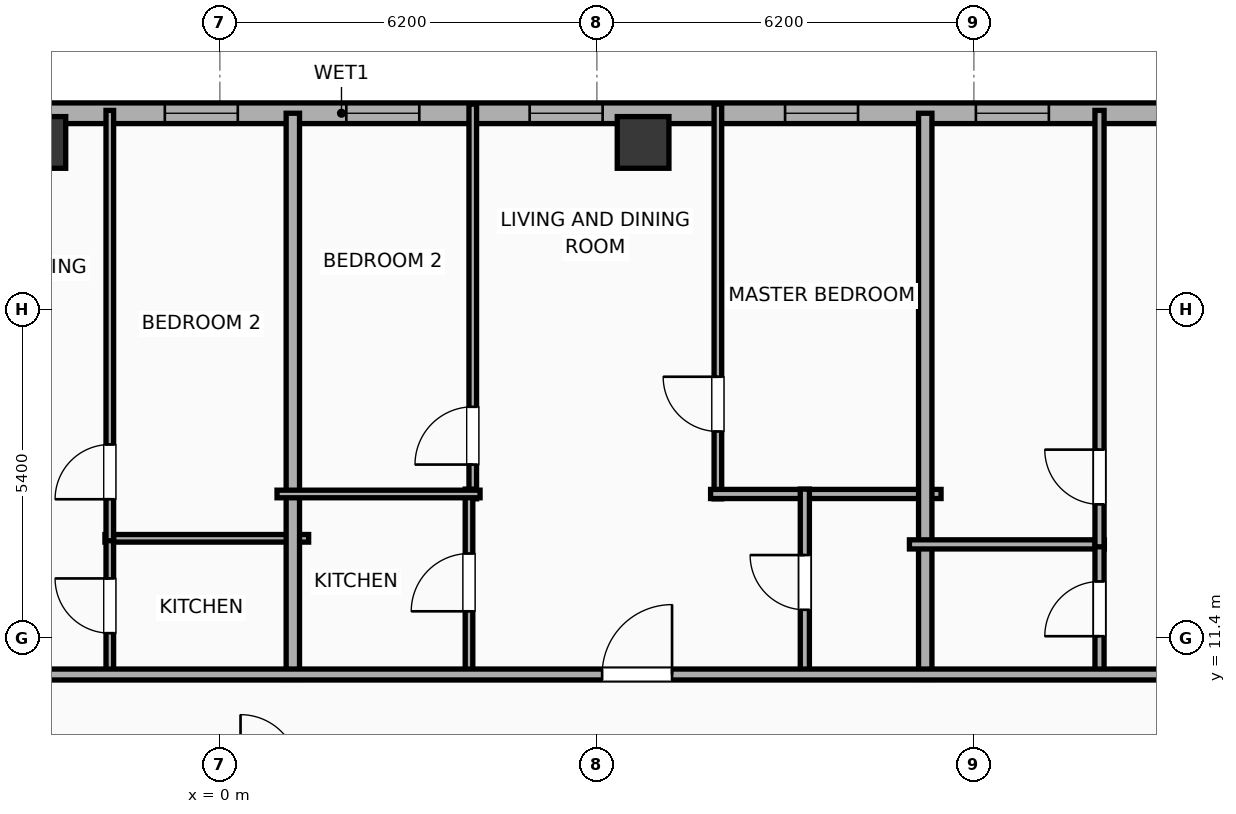
"""IFC4 building model, lengths in metres.
Left out: names, types, materials, properties, quantities, classifications, styles, units other than length and angle.
Written with IfcOpenShell. Run it as: python <this file> out.ifc"""

import sys

from ifc_helpers import new_model, si_unit, direction, frame, frame_2d, origin, origin_2d, place, context, subcontext, project, spatial, rectangle, hollow_rectangle, extrude, element, fill, save


model = new_model("IFC4")
c1 = context("Model", 3, precision=1e-05, world=origin(), true_north=direction((0.0, 1.0)))
c2 = subcontext(c1, "Body", "Model", "MODEL_VIEW")
j1 = project(units=[si_unit("LENGTHUNIT", "METRE"), si_unit("PLANEANGLEUNIT", "RADIAN")], contexts=[c1])
p1 = place(None, origin())
s1 = spatial("IfcSite", under=j1, at=p1, CompositionType="ELEMENT")
p2 = place(p1, origin())
s2 = spatial("IfcBuilding", under=s1, at=p2, CompositionType="ELEMENT")
p3 = place(p2, frame((0.0, 0.0, 219.7)))
s3 = spatial("IfcBuildingStorey", under=s2, at=p3, CompositionType="ELEMENT", Elevation=219.7)
for number, where, z_axis, x_axis in (
    (1, (6.96, 19.55, 0.0), (0.0, 0.0, 1.0), (1.0, 0.0, 0.0)),
    (2, (-2.96, 19.55, 0.0), (0.0, 0.0, 1.0), (1.0, 0.0, 0.0)),
):
    element("IfcColumn", number, at=place(p3, frame(where, z_axis=z_axis, x_axis=x_axis)), inside=s3, PredefinedType="COLUMN", context=c2, shape_type="SweptSolid", body=[
        extrude(hollow_rectangle(XDim=0.85, YDim=0.85, WallThickness=0.028, at=origin_2d()), origin(), (0.0, 0.0, 1.0), 3.9),
    ])
p4 = place(p3, frame((-22.783, 20.03, 0.0), z_axis=(0.0, 0.0, 1.0), x_axis=(1.0, 0.0, 0.0)))
e3 = element("IfcWall", 3, at=p4, inside=s3, PredefinedType="ELEMENTEDWALL", context=c2, shape_type="SweptSolid", body=[
    extrude(rectangle(XDim=49.566, YDim=0.34, at=frame_2d((24.783, 0.0))), origin(), (0.0, 0.0, 1.0), 3.65),
])
p5 = place(p4, frame((40.956, 0.0, 0.75)))
e4 = element("IfcOpeningElement", 4, at=p5, cuts=e3, PredefinedType="OPENING", context=c2, shape_type="SweptSolid", body=[
    extrude(rectangle(XDim=2.4, YDim=2.1, at=frame_2d((1.2, 1.05))), frame((0.0, 0.18, 0.0), z_axis=(0.0, -1.0, 0.0), x_axis=(1.0, 0.0, 0.0)), (0.0, 0.0, 1.0), 0.36),
])
p6 = place(p4, frame((1.437, 0.0, 0.75)))
e5 = element("IfcOpeningElement", 5, at=p6, cuts=e3, PredefinedType="OPENING", context=c2, shape_type="SweptSolid", body=[
    extrude(rectangle(XDim=1.2, YDim=2.05, at=frame_2d((0.6, 1.025))), frame((0.0, 0.18, 0.0), z_axis=(0.0, -1.0, 0.0), x_axis=(1.0, 0.0, 0.0)), (0.0, 0.0, 1.0), 0.36),
])
p7 = place(p4, frame((7.619, 0.0, 0.75)))
e6 = element("IfcOpeningElement", 6, at=p7, cuts=e3, PredefinedType="OPENING", context=c2, shape_type="SweptSolid", body=[
    extrude(rectangle(XDim=1.2, YDim=2.05, at=frame_2d((0.6, 1.025))), frame((0.0, 0.18, 0.0), z_axis=(0.0, -1.0, 0.0), x_axis=(1.0, 0.0, 0.0)), (0.0, 0.0, 1.0), 0.36),
])
p8 = place(p4, frame((4.124, 0.0, 0.75)))
e7 = element("IfcOpeningElement", 7, at=p8, cuts=e3, PredefinedType="OPENING", context=c2, shape_type="SweptSolid", body=[
    extrude(rectangle(XDim=1.2, YDim=2.05, at=frame_2d((0.6, 1.025))), frame((0.0, 0.18, 0.0), z_axis=(0.0, -1.0, 0.0), x_axis=(1.0, 0.0, 0.0)), (0.0, 0.0, 1.0), 0.36),
])
p9 = place(p4, frame((11.278, 0.0, 0.75)))
e8 = element("IfcOpeningElement", 8, at=p9, cuts=e3, PredefinedType="OPENING", context=c2, shape_type="SweptSolid", body=[
    extrude(rectangle(XDim=1.2, YDim=2.05, at=frame_2d((0.6, 1.025))), frame((0.0, 0.18, 0.0), z_axis=(0.0, -1.0, 0.0), x_axis=(1.0, 0.0, 0.0)), (0.0, 0.0, 1.0), 0.36),
])
p10 = place(p4, frame((17.953, 0.0, 0.75)))
e9 = element("IfcOpeningElement", 9, at=p10, cuts=e3, PredefinedType="OPENING", context=c2, shape_type="SweptSolid", body=[
    extrude(rectangle(XDim=1.2, YDim=2.05, at=frame_2d((0.6, 1.025))), frame((0.0, 0.18, 0.0), z_axis=(0.0, -1.0, 0.0), x_axis=(1.0, 0.0, 0.0)), (0.0, 0.0, 1.0), 0.36),
])
p11 = place(p4, frame((14.738, 0.0, 0.75)))
e10 = element("IfcOpeningElement", 10, at=p11, cuts=e3, PredefinedType="OPENING", context=c2, shape_type="SweptSolid", body=[
    extrude(rectangle(XDim=1.2, YDim=2.05, at=frame_2d((0.6, 1.025))), frame((0.0, 0.18, 0.0), z_axis=(0.0, -1.0, 0.0), x_axis=(1.0, 0.0, 0.0)), (0.0, 0.0, 1.0), 0.36),
])
p12 = place(p4, frame((21.878, 0.0, 0.75)))
e11 = element("IfcOpeningElement", 11, at=p12, cuts=e3, PredefinedType="OPENING", context=c2, shape_type="SweptSolid", body=[
    extrude(rectangle(XDim=1.2, YDim=2.05, at=frame_2d((0.6, 1.025))), frame((0.0, 0.18, 0.0), z_axis=(0.0, -1.0, 0.0), x_axis=(1.0, 0.0, 0.0)), (0.0, 0.0, 1.0), 0.36),
])
p13 = place(p4, frame((27.878, 0.0, 0.75)))
e12 = element("IfcOpeningElement", 12, at=p13, cuts=e3, PredefinedType="OPENING", context=c2, shape_type="SweptSolid", body=[
    extrude(rectangle(XDim=1.2, YDim=2.05, at=frame_2d((0.6, 1.025))), frame((0.0, 0.18, 0.0), z_axis=(0.0, -1.0, 0.0), x_axis=(1.0, 0.0, 0.0)), (0.0, 0.0, 1.0), 0.36),
])
p14 = place(p4, frame((24.863, 0.0, 0.75)))
e13 = element("IfcOpeningElement", 13, at=p14, cuts=e3, PredefinedType="OPENING", context=c2, shape_type="SweptSolid", body=[
    extrude(rectangle(XDim=1.2, YDim=2.05, at=frame_2d((0.6, 1.025))), frame((0.0, 0.18, 0.0), z_axis=(0.0, -1.0, 0.0), x_axis=(1.0, 0.0, 0.0)), (0.0, 0.0, 1.0), 0.36),
])
p15 = place(p4, frame((32.078, 0.0, 0.75)))
e14 = element("IfcOpeningElement", 14, at=p15, cuts=e3, PredefinedType="OPENING", context=c2, shape_type="SweptSolid", body=[
    extrude(rectangle(XDim=1.2, YDim=2.05, at=frame_2d((0.6, 1.025))), frame((0.0, 0.18, 0.0), z_axis=(0.0, -1.0, 0.0), x_axis=(1.0, 0.0, 0.0)), (0.0, 0.0, 1.0), 0.36),
])
p16 = place(p4, frame((35.216, 0.0, 0.75)))
e15 = element("IfcOpeningElement", 15, at=p16, cuts=e3, PredefinedType="OPENING", context=c2, shape_type="SweptSolid", body=[
    extrude(rectangle(XDim=1.2, YDim=2.05, at=frame_2d((0.6, 1.025))), frame((0.0, 0.18, 0.0), z_axis=(0.0, -1.0, 0.0), x_axis=(1.0, 0.0, 0.0)), (0.0, 0.0, 1.0), 0.36),
])
p17 = place(p4, frame((45.73, 0.0, 0.75)))
e16 = element("IfcOpeningElement", 16, at=p17, cuts=e3, PredefinedType="OPENING", context=c2, shape_type="SweptSolid", body=[
    extrude(rectangle(XDim=1.2, YDim=2.05, at=frame_2d((0.6, 1.025))), frame((0.0, 0.18, 0.0), z_axis=(0.0, -1.0, 0.0), x_axis=(1.0, 0.0, 0.0)), (0.0, 0.0, 1.0), 0.36),
])
p18 = place(p3, frame((-1.89, 13.04, 0.0), z_axis=(0.0, 0.0, 1.0), x_axis=(1.0, 0.0, 0.0)))
e17 = element("IfcWall", 17, at=p18, inside=s3, PredefinedType="PARTITIONING", context=c2, shape_type="SweptSolid", body=[
    extrude(rectangle(XDim=3.35, YDim=0.125, at=frame_2d((1.675, 0.0))), origin(), (0.0, 0.0, 1.0), 3.65),
])
p19 = place(p3, frame((-1.81, 10.78, 0.0), z_axis=(0.0, 0.0, 1.0), x_axis=(0.0, 1.0, 0.0)))
e18 = element("IfcWall", 18, at=p19, inside=s3, PredefinedType="PARTITIONING", context=c2, shape_type="SweptSolid", body=[
    extrude(rectangle(XDim=2.3, YDim=0.125, at=frame_2d((1.15, 0.0))), origin(), (0.0, 0.0, 1.0), 3.65),
])
p20 = place(p19, frame((0.7, 0.0, 0.0)))
e19 = element("IfcOpeningElement", 19, at=p20, cuts=e18, PredefinedType="OPENING", context=c2, shape_type="SweptSolid", body=[
    extrude(rectangle(XDim=0.9, YDim=2.05, at=frame_2d((0.45, 1.025))), frame((0.0, 0.073, 0.0), z_axis=(0.0, -1.0, 0.0), x_axis=(1.0, 0.0, 0.0)), (0.0, 0.0, 1.0), 0.145),
])
p21 = place(p3, frame((-1.81, 13.0, 0.0), z_axis=(0.0, 0.0, 1.0), x_axis=(0.0, 1.0, 0.0)))
e20 = element("IfcWall", 20, at=p21, inside=s3, PredefinedType="PARTITIONING", context=c2, shape_type="SweptSolid", body=[
    extrude(rectangle(XDim=7.077, YDim=0.125, at=frame_2d((3.539, 0.0))), origin(), (0.0, 0.0, 1.0), 3.65),
])
p22 = place(p21, frame((0.682, 0.0, 0.0)))
e21 = element("IfcOpeningElement", 21, at=p22, cuts=e20, PredefinedType="OPENING", context=c2, shape_type="SweptSolid", body=[
    extrude(rectangle(XDim=0.9, YDim=2.05, at=frame_2d((0.45, 1.025))), frame((0.0, 0.073, 0.0), z_axis=(0.0, -1.0, 0.0), x_axis=(1.0, 0.0, 0.0)), (0.0, 0.0, 1.0), 0.145),
])
p23 = place(p3, frame((1.2, 10.72, 0.0), z_axis=(0.0, 0.0, 1.0), x_axis=(0.0, 1.0, 0.0)))
e22 = element("IfcWall", 22, at=p23, inside=s3, PredefinedType="PARTITIONING", context=c2, shape_type="SweptSolid", body=[
    extrude(rectangle(XDim=9.31, YDim=0.22, at=frame_2d((4.655, 0.0))), origin(), (0.0, 0.0, 1.0), 3.65),
])
p24 = place(p3, frame((4.159, 13.689, 0.0), z_axis=(0.0, 0.0, 1.0), x_axis=(0.0, 1.0, 0.0)))
e23 = element("IfcWall", 23, at=p24, inside=s3, PredefinedType="PARTITIONING", context=c2, shape_type="SweptSolid", body=[
    extrude(rectangle(XDim=6.491, YDim=0.125, at=frame_2d((3.246, 0.0))), origin(), (0.0, 0.0, 1.0), 3.65),
])
p25 = place(p24, frame((0.564, 0.0, 0.0)))
e24 = element("IfcOpeningElement", 24, at=p25, cuts=e23, PredefinedType="OPENING", context=c2, shape_type="SweptSolid", body=[
    extrude(rectangle(XDim=0.95, YDim=2.05, at=frame_2d((0.475, 1.025))), frame((0.0, 0.073, 0.0), z_axis=(0.0, -1.0, 0.0), x_axis=(1.0, 0.0, 0.0)), (0.0, 0.0, 1.0), 0.145),
])
p26 = place(p3, frame((8.19, 13.689, 0.0), z_axis=(0.0, 0.0, 1.0), x_axis=(0.0, 1.0, 0.0)))
e25 = element("IfcWall", 25, at=p26, inside=s3, PredefinedType="PARTITIONING", context=c2, shape_type="SweptSolid", body=[
    extrude(rectangle(XDim=6.491, YDim=0.125, at=frame_2d((3.246, 0.0))), origin(), (0.0, 0.0, 1.0), 3.65),
])
p27 = place(p26, frame((1.108, 0.0, 0.0)))
e26 = element("IfcOpeningElement", 26, at=p27, cuts=e25, PredefinedType="OPENING", context=c2, shape_type="SweptSolid", body=[
    extrude(rectangle(XDim=0.9, YDim=2.05, at=frame_2d((0.45, 1.025))), frame((0.0, 0.073, 0.0), z_axis=(0.0, -1.0, 0.0), x_axis=(1.0, 0.0, 0.0)), (0.0, 0.0, 1.0), 0.145),
])
p28 = place(p3, frame((8.07, 13.769, 0.0), z_axis=(0.0, 0.0, 1.0), x_axis=(1.0, 0.0, 0.0)))
e27 = element("IfcWall", 27, at=p28, inside=s3, PredefinedType="PLUMBINGWALL", context=c2, shape_type="SweptSolid", body=[
    extrude(rectangle(XDim=3.79, YDim=0.15, at=frame_2d((1.895, 0.0))), origin(), (0.0, 0.0, 1.0), 3.65),
])
p29 = place(p3, frame((4.097, 10.78, 0.0), z_axis=(0.0, 0.0, 1.0), x_axis=(0.0, 1.0, 0.0)))
e28 = element("IfcWall", 28, at=p29, inside=s3, PredefinedType="PARTITIONING", context=c2, shape_type="SweptSolid", body=[
    extrude(rectangle(XDim=3.069, YDim=0.125, at=frame_2d((1.535, 0.0))), origin(), (0.0, 0.0, 1.0), 3.65),
])
p30 = place(p29, frame((1.06, 0.0, 0.0)))
e29 = element("IfcOpeningElement", 29, at=p30, cuts=e28, PredefinedType="OPENING", context=c2, shape_type="SweptSolid", body=[
    extrude(rectangle(XDim=0.95, YDim=2.05, at=frame_2d((0.475, 1.025))), frame((0.0, 0.073, 0.0), z_axis=(0.0, -1.0, 0.0), x_axis=(1.0, 0.0, 0.0)), (0.0, 0.0, 1.0), 0.145),
])
p31 = place(p3, frame((0.94, 13.769, 0.0), z_axis=(0.0, 0.0, 1.0), x_axis=(1.0, 0.0, 0.0)))
e30 = element("IfcWall", 30, at=p31, inside=s3, PredefinedType="PARTITIONING", context=c2, shape_type="SweptSolid", body=[
    extrude(rectangle(XDim=3.339, YDim=0.125, at=frame_2d((1.669, 0.0))), origin(), (0.0, 0.0, 1.0), 3.65),
])
p32 = place(p3, frame((9.62, 10.78, 0.0), z_axis=(0.0, 0.0, 1.0), x_axis=(0.0, 1.0, 0.0)))
e31 = element("IfcWall", 31, at=p32, inside=s3, PredefinedType="PLUMBINGWALL", context=c2, shape_type="SweptSolid", body=[
    extrude(rectangle(XDim=3.069, YDim=0.15, at=frame_2d((1.535, 0.0))), origin(), (0.0, 0.0, 1.0), 3.65),
])
p33 = place(p32, frame((1.084, 0.0, 0.0)))
e32 = element("IfcOpeningElement", 32, at=p33, cuts=e31, PredefinedType="OPENING", context=c2, shape_type="SweptSolid", body=[
    extrude(rectangle(XDim=0.9, YDim=2.05, at=frame_2d((0.45, 1.025))), frame((0.0, 0.085, 0.0), z_axis=(0.0, -1.0, 0.0), x_axis=(1.0, 0.0, 0.0)), (0.0, 0.0, 1.0), 0.17),
])
p34 = place(p3, frame((11.6, 10.72, 0.0), z_axis=(0.0, 0.0, 1.0), x_axis=(0.0, 1.0, 0.0)))
e33 = element("IfcWall", 33, at=p34, inside=s3, PredefinedType="PARTITIONING", context=c2, shape_type="SweptSolid", body=[
    extrude(rectangle(XDim=9.31, YDim=0.22, at=frame_2d((4.655, 0.0))), origin(), (0.0, 0.0, 1.0), 3.65),
])
p35 = place(p3, frame((11.34, 12.94, 0.0), z_axis=(0.0, 0.0, 1.0), x_axis=(1.0, 0.0, 0.0)))
e34 = element("IfcWall", 34, at=p35, inside=s3, PredefinedType="PLUMBINGWALL", context=c2, shape_type="SweptSolid", body=[
    extrude(rectangle(XDim=3.206, YDim=0.15, at=frame_2d((1.603, 0.0))), origin(), (0.0, 0.0, 1.0), 3.65),
])
p36 = place(p3, frame((14.466, 10.78, 0.0), z_axis=(0.0, 0.0, 1.0), x_axis=(0.0, 1.0, 0.0)))
e35 = element("IfcWall", 35, at=p36, inside=s3, PredefinedType="PLUMBINGWALL", context=c2, shape_type="SweptSolid", body=[
    extrude(rectangle(XDim=2.2, YDim=0.15, at=frame_2d((1.1, 0.0))), origin(), (0.0, 0.0, 1.0), 3.65),
])
p37 = place(p36, frame((0.65, 0.0, 0.0)))
e36 = element("IfcOpeningElement", 36, at=p37, cuts=e35, PredefinedType="OPENING", context=c2, shape_type="SweptSolid", body=[
    extrude(rectangle(XDim=0.9, YDim=2.05, at=frame_2d((0.45, 1.025))), frame((0.0, 0.085, 0.0), z_axis=(0.0, -1.0, 0.0), x_axis=(1.0, 0.0, 0.0)), (0.0, 0.0, 1.0), 0.17),
])
p38 = place(p3, frame((14.466, 12.9, 0.0), z_axis=(0.0, 0.0, 1.0), x_axis=(0.0, 1.0, 0.0)))
e37 = element("IfcWall", 37, at=p38, inside=s3, PredefinedType="PLUMBINGWALL", context=c2, shape_type="SweptSolid", body=[
    extrude(rectangle(XDim=7.177, YDim=0.15, at=frame_2d((3.588, 0.0))), origin(), (0.0, 0.0, 1.0), 3.65),
])
p39 = place(p38, frame((0.698, 0.0, 0.0)))
e38 = element("IfcOpeningElement", 38, at=p39, cuts=e37, PredefinedType="OPENING", context=c2, shape_type="SweptSolid", body=[
    extrude(rectangle(XDim=0.9, YDim=2.05, at=frame_2d((0.45, 1.025))), frame((0.0, 0.085, 0.0), z_axis=(0.0, -1.0, 0.0), x_axis=(1.0, 0.0, 0.0)), (0.0, 0.0, 1.0), 0.17),
])
p40 = place(p3, frame((-26.23, 10.8, 0.0), z_axis=(0.0, 0.0, 1.0), x_axis=(1.0, 0.0, 0.0)))
e39 = element("IfcWall", 39, at=p40, inside=s3, PredefinedType="PARTITIONING", context=c2, shape_type="SweptSolid", body=[
    extrude(rectangle(XDim=56.46, YDim=0.18, at=frame_2d((28.23, 0.0))), origin(), (0.0, 0.0, 1.0), 3.65),
])
p41 = place(p40, frame((2.994, 0.0, 0.0)))
e40 = element("IfcOpeningElement", 40, at=p41, cuts=e39, PredefinedType="OPENING", context=c2, shape_type="SweptSolid", body=[
    extrude(rectangle(XDim=0.9, YDim=2.05, at=frame_2d((0.45, 1.025))), frame((0.0, 0.1, 0.0), z_axis=(0.0, -1.0, 0.0), x_axis=(1.0, 0.0, 0.0)), (0.0, 0.0, 1.0), 0.2),
])
p42 = place(p40, frame((11.745, 0.0, 0.0)))
e41 = element("IfcOpeningElement", 41, at=p42, cuts=e39, PredefinedType="OPENING", context=c2, shape_type="SweptSolid", body=[
    extrude(rectangle(XDim=1.15, YDim=2.05, at=frame_2d((0.575, 1.025))), frame((0.0, 0.1, 0.0), z_axis=(0.0, -1.0, 0.0), x_axis=(1.0, 0.0, 0.0)), (0.0, 0.0, 1.0), 0.2),
])
p43 = place(p40, frame((21.907, 0.0, 0.0)))
e42 = element("IfcOpeningElement", 42, at=p43, cuts=e39, PredefinedType="OPENING", context=c2, shape_type="SweptSolid", body=[
    extrude(rectangle(XDim=1.15, YDim=2.05, at=frame_2d((0.575, 1.025))), frame((0.0, 0.1, 0.0), z_axis=(0.0, -1.0, 0.0), x_axis=(1.0, 0.0, 0.0)), (0.0, 0.0, 1.0), 0.2),
])
p44 = place(p40, frame((32.516, 0.0, 0.0)))
e43 = element("IfcOpeningElement", 43, at=p44, cuts=e39, PredefinedType="OPENING", context=c2, shape_type="SweptSolid", body=[
    extrude(rectangle(XDim=1.15, YDim=2.05, at=frame_2d((0.575, 1.025))), frame((0.0, 0.1, 0.0), z_axis=(0.0, -1.0, 0.0), x_axis=(1.0, 0.0, 0.0)), (0.0, 0.0, 1.0), 0.2),
])
p45 = place(p40, frame((41.956, 0.0, 0.0)))
e44 = element("IfcOpeningElement", 44, at=p45, cuts=e39, PredefinedType="OPENING", context=c2, shape_type="SweptSolid", body=[
    extrude(rectangle(XDim=1.15, YDim=2.05, at=frame_2d((0.575, 1.025))), frame((0.0, 0.1, 0.0), z_axis=(0.0, -1.0, 0.0), x_axis=(1.0, 0.0, 0.0)), (0.0, 0.0, 1.0), 0.2),
])
p46 = place(p40, frame((51.656, 0.0, 0.0)))
e45 = element("IfcOpeningElement", 45, at=p46, cuts=e39, PredefinedType="OPENING", context=c2, shape_type="SweptSolid", body=[
    extrude(rectangle(XDim=1.15, YDim=2.05, at=frame_2d((0.575, 1.025))), frame((0.0, 0.1, 0.0), z_axis=(0.0, -1.0, 0.0), x_axis=(1.0, 0.0, 0.0)), (0.0, 0.0, 1.0), 0.2),
])
p47 = place(p12, origin())
e46 = element("IfcWindow", 46, at=p47, inside=s3, PartitioningType="SINGLE_PANEL", PredefinedType="WINDOW", context=c2, shape_type="SweptSolid", body=[
    extrude(rectangle(XDim=1.2, YDim=2.05, at=frame_2d((0.6, 1.025))), frame((0.0, 0.03, 0.0), z_axis=(0.0, -1.0, 0.0), x_axis=(1.0, 0.0, 0.0)), (0.0, 0.0, 1.0), 0.06),
])
fill(e11, e46)
p48 = place(p13, origin())
e47 = element("IfcWindow", 47, at=p48, inside=s3, PartitioningType="SINGLE_PANEL", PredefinedType="WINDOW", context=c2, shape_type="SweptSolid", body=[
    extrude(rectangle(XDim=1.2, YDim=2.05, at=frame_2d((0.6, 1.025))), frame((0.0, 0.03, 0.0), z_axis=(0.0, -1.0, 0.0), x_axis=(1.0, 0.0, 0.0)), (0.0, 0.0, 1.0), 0.06),
])
fill(e12, e47)
p49 = place(p14, origin())
e48 = element("IfcWindow", 48, at=p49, inside=s3, PartitioningType="SINGLE_PANEL", PredefinedType="WINDOW", context=c2, shape_type="SweptSolid", body=[
    extrude(rectangle(XDim=1.2, YDim=2.05, at=frame_2d((0.6, 1.025))), frame((0.0, 0.03, 0.0), z_axis=(0.0, -1.0, 0.0), x_axis=(1.0, 0.0, 0.0)), (0.0, 0.0, 1.0), 0.06),
])
fill(e13, e48)
p50 = place(p15, origin())
e49 = element("IfcWindow", 49, at=p50, inside=s3, PartitioningType="SINGLE_PANEL", PredefinedType="WINDOW", context=c2, shape_type="SweptSolid", body=[
    extrude(rectangle(XDim=1.2, YDim=2.05, at=frame_2d((0.6, 1.025))), frame((0.0, 0.03, 0.0), z_axis=(0.0, -1.0, 0.0), x_axis=(1.0, 0.0, 0.0)), (0.0, 0.0, 1.0), 0.06),
])
fill(e14, e49)
p51 = place(p16, origin())
e50 = element("IfcWindow", 50, at=p51, inside=s3, PartitioningType="SINGLE_PANEL", PredefinedType="WINDOW", context=c2, shape_type="SweptSolid", body=[
    extrude(rectangle(XDim=1.2, YDim=2.05, at=frame_2d((0.6, 1.025))), frame((0.0, 0.03, 0.0), z_axis=(0.0, -1.0, 0.0), x_axis=(1.0, 0.0, 0.0)), (0.0, 0.0, 1.0), 0.06),
])
fill(e15, e50)
p52 = place(p20, origin())
e51 = element("IfcDoor", 51, at=p52, inside=s3, OperationType="SINGLE_SWING_RIGHT", PredefinedType="DOOR", context=c2, shape_type="SweptSolid", body=[
    extrude(rectangle(XDim=0.9, YDim=2.05, at=frame_2d((0.45, 1.025))), frame((0.0, 0.025, 0.0), z_axis=(0.0, -1.0, 0.0), x_axis=(1.0, 0.0, 0.0)), (0.0, 0.0, 1.0), 0.05),
])
fill(e19, e51)
p53 = place(p22, origin())
e52 = element("IfcDoor", 52, at=p53, inside=s3, OperationType="SINGLE_SWING_LEFT", PredefinedType="DOOR", context=c2, shape_type="SweptSolid", body=[
    extrude(rectangle(XDim=0.9, YDim=2.05, at=frame_2d((0.45, 1.025))), frame((0.0, 0.025, 0.0), z_axis=(0.0, -1.0, 0.0), x_axis=(1.0, 0.0, 0.0)), (0.0, 0.0, 1.0), 0.05),
])
fill(e21, e52)
p54 = place(p25, origin())
e53 = element("IfcDoor", 53, at=p54, inside=s3, OperationType="SINGLE_SWING_LEFT", PredefinedType="DOOR", context=c2, shape_type="SweptSolid", body=[
    extrude(rectangle(XDim=0.95, YDim=2.05, at=frame_2d((0.475, 1.025))), frame((0.0, 0.025, 0.0), z_axis=(0.0, -1.0, 0.0), x_axis=(1.0, 0.0, 0.0)), (0.0, 0.0, 1.0), 0.05),
])
fill(e24, e53)
p55 = place(p27, origin())
e54 = element("IfcDoor", 54, at=p55, inside=s3, OperationType="SINGLE_SWING_RIGHT", PredefinedType="DOOR", context=c2, shape_type="SweptSolid", body=[
    extrude(rectangle(XDim=0.9, YDim=2.05, at=frame_2d((0.45, 1.025))), frame((0.0, 0.025, 0.0), z_axis=(0.0, -1.0, 0.0), x_axis=(1.0, 0.0, 0.0)), (0.0, 0.0, 1.0), 0.05),
])
fill(e26, e54)
p56 = place(p30, origin())
e55 = element("IfcDoor", 55, at=p56, inside=s3, OperationType="SINGLE_SWING_LEFT", PredefinedType="DOOR", context=c2, shape_type="SweptSolid", body=[
    extrude(rectangle(XDim=0.95, YDim=2.05, at=frame_2d((0.475, 1.025))), frame((0.0, 0.025, 0.0), z_axis=(0.0, -1.0, 0.0), x_axis=(1.0, 0.0, 0.0)), (0.0, 0.0, 1.0), 0.05),
])
fill(e29, e55)
p57 = place(p33, origin())
e56 = element("IfcDoor", 56, at=p57, inside=s3, OperationType="SINGLE_SWING_RIGHT", PredefinedType="DOOR", context=c2, shape_type="SweptSolid", body=[
    extrude(rectangle(XDim=0.9, YDim=2.05, at=frame_2d((0.45, 1.025))), frame((0.0, 0.025, 0.0), z_axis=(0.0, -1.0, 0.0), x_axis=(1.0, 0.0, 0.0)), (0.0, 0.0, 1.0), 0.05),
])
fill(e32, e56)
p58 = place(p37, origin())
e57 = element("IfcDoor", 57, at=p58, inside=s3, OperationType="SINGLE_SWING_LEFT", PredefinedType="DOOR", context=c2, shape_type="SweptSolid", body=[
    extrude(rectangle(XDim=0.9, YDim=2.05, at=frame_2d((0.45, 1.025))), frame((0.0, 0.025, 0.0), z_axis=(0.0, -1.0, 0.0), x_axis=(1.0, 0.0, 0.0)), (0.0, 0.0, 1.0), 0.05),
])
fill(e36, e57)
p59 = place(p39, origin())
e58 = element("IfcDoor", 58, at=p59, inside=s3, OperationType="SINGLE_SWING_RIGHT", PredefinedType="DOOR", context=c2, shape_type="SweptSolid", body=[
    extrude(rectangle(XDim=0.9, YDim=2.05, at=frame_2d((0.45, 1.025))), frame((0.0, 0.025, 0.0), z_axis=(0.0, -1.0, 0.0), x_axis=(1.0, 0.0, 0.0)), (0.0, 0.0, 1.0), 0.05),
])
fill(e38, e58)
p60 = place(p44, origin())
e59 = element("IfcDoor", 59, at=p60, inside=s3, OperationType="SINGLE_SWING_RIGHT", PredefinedType="DOOR", context=c2, shape_type="SweptSolid", body=[
    extrude(rectangle(XDim=1.15, YDim=2.05, at=frame_2d((0.575, 1.025))), frame((0.0, 0.025, 0.0), z_axis=(0.0, -1.0, 0.0), x_axis=(1.0, 0.0, 0.0)), (0.0, 0.0, 1.0), 0.05),
])
fill(e43, e59)
save(model, sys.argv[1])
